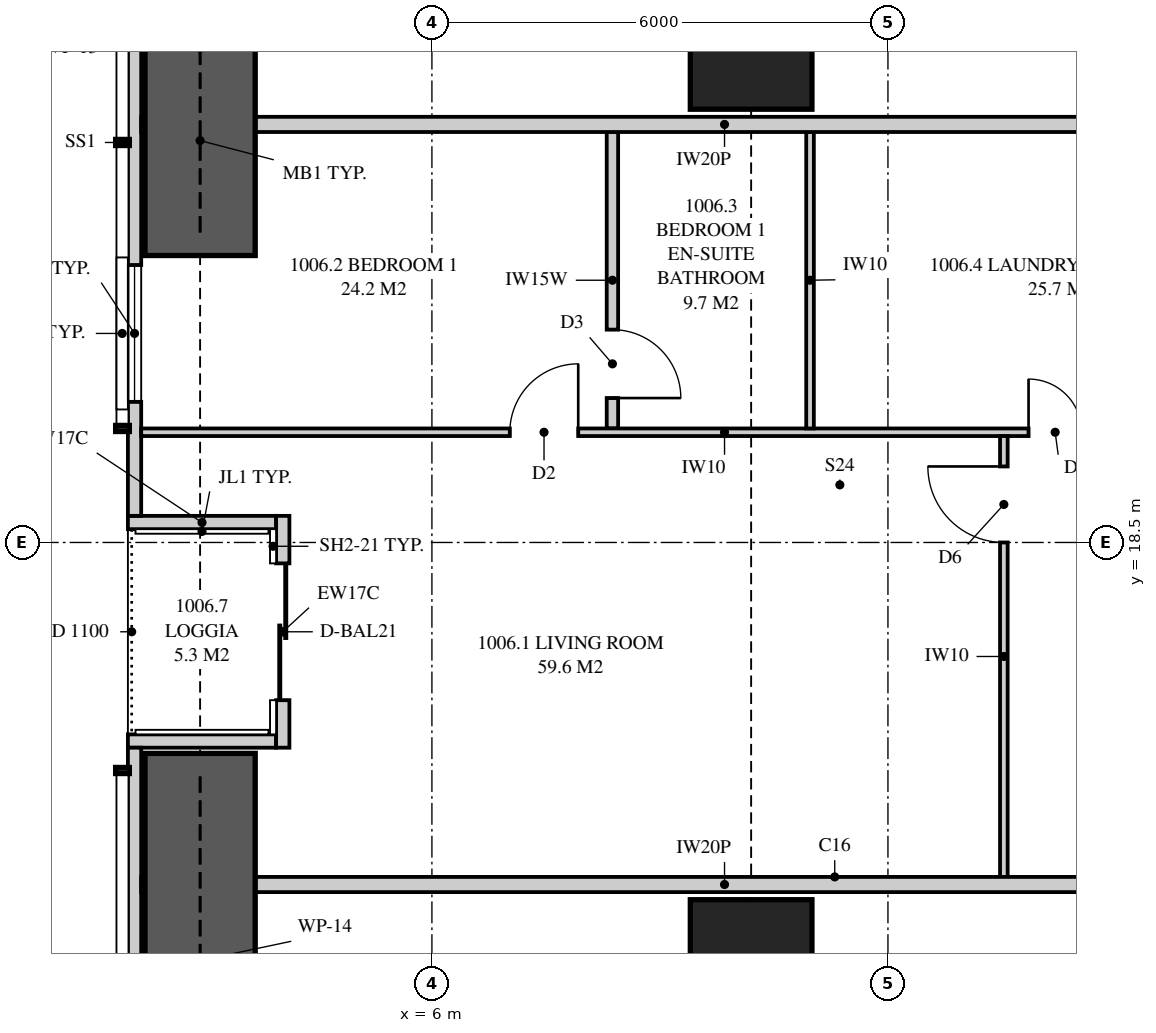
"""IFC4 building model, lengths in metres.
Left out: names, types, materials, properties, quantities, classifications, styles, units other than length and angle.
Written with IfcOpenShell. Run it as: python <this file> out.ifc"""

import sys

from ifc_helpers import new_model, si_unit, direction, frame, frame_2d, origin, origin_2d, place, context, subcontext, project, spatial, polyline, rectangle, outline, extrude, element, fill, save


model = new_model("IFC4")
c1 = context("Model", 3, precision=1e-05, world=origin(), true_north=direction((0.0, 1.0)))
c2 = subcontext(c1, "Body", "Model", "MODEL_VIEW")
j1 = project(units=[si_unit("LENGTHUNIT", "METRE"), si_unit("PLANEANGLEUNIT", "RADIAN")], contexts=[c1])
p1 = place(None, origin())
s1 = spatial("IfcSite", under=j1, at=p1, CompositionType="ELEMENT")
p2 = place(p1, origin())
s2 = spatial("IfcBuilding", under=s1, at=p2, CompositionType="ELEMENT")
p3 = place(p2, frame((0.0, 0.0, 41.1)))
s3 = spatial("IfcBuildingStorey", under=s2, at=p3, CompositionType="ELEMENT", Elevation=41.1)
for number, where, z_axis, x_axis in (
    (1, (10.2, 13.0, 0.0), (0.0, 0.0, 1.0), (1.0, 0.0, 0.0)),
    (2, (10.2, 25.0, 0.0), (0.0, 0.0, 1.0), (1.0, 0.0, 0.0)),
):
    element("IfcColumn", number, at=place(p3, frame(where, z_axis=z_axis, x_axis=x_axis)), inside=s3, PredefinedType="COLUMN", context=c2, shape_type="SweptSolid", body=[
        extrude(rectangle(XDim=1.6, YDim=1.6, at=origin_2d()), origin(), (0.0, 0.0, 1.0), 3.35),
    ])
p4 = place(p3, frame((2.087, 34.949, 0.0), z_axis=(0.0, 0.0, 1.0), x_axis=(0.0, -1.0, 0.0)))
e3 = element("IfcWall", 3, at=p4, inside=s3, PredefinedType="SOLIDWALL", context=c2, shape_type="SweptSolid", body=[
    extrude(outline(polyline([(0.0, 0.0), (16.099, 0.0), (16.099, 2.15), (9.949, 2.15), (9.949, 3.11), (9.823, 3.11), (9.823, 2.15), (9.73, 2.15), (9.73, 3.11), (0.0, 3.11), (0.0, 0.0)])), frame((0.0, 0.087, 0.0), z_axis=(0.0, -1.0, 0.0), x_axis=(1.0, 0.0, 0.0)), (0.0, 0.0, 1.0), 0.175),
])
p5 = place(p4, frame((2.757, 0.0, 0.4)))
e4 = element("IfcOpeningElement", 4, at=p5, cuts=e3, PredefinedType="OPENING", context=c2, shape_type="SweptSolid", body=[
    extrude(rectangle(XDim=1.8, YDim=1.7, at=frame_2d((0.9, 0.85))), frame((0.0, 0.097, 0.0), z_axis=(0.0, -1.0, 0.0), x_axis=(1.0, 0.0, 0.0)), (0.0, 0.0, 1.0), 0.195),
])
p6 = place(p4, frame((5.924, 0.0, 0.4)))
e5 = element("IfcOpeningElement", 5, at=p6, cuts=e3, PredefinedType="OPENING", context=c2, shape_type="SweptSolid", body=[
    extrude(rectangle(XDim=1.2, YDim=1.7, at=frame_2d((0.6, 0.85))), frame((0.0, 0.097, 0.0), z_axis=(0.0, -1.0, 0.0), x_axis=(1.0, 0.0, 0.0)), (0.0, 0.0, 1.0), 0.195),
])
p7 = place(p4, frame((12.799, 0.0, 0.4)))
e6 = element("IfcOpeningElement", 6, at=p7, cuts=e3, PredefinedType="OPENING", context=c2, shape_type="SweptSolid", body=[
    extrude(rectangle(XDim=1.8, YDim=1.7, at=frame_2d((0.9, 0.85))), frame((0.0, 0.097, 0.0), z_axis=(0.0, -1.0, 0.0), x_axis=(1.0, 0.0, 0.0)), (0.0, 0.0, 1.0), 0.195),
])
p8 = place(p3, frame((2.087, 15.8, 0.0), z_axis=(0.0, 0.0, 1.0), x_axis=(0.0, -1.0, 0.0)))
e7 = element("IfcWall", 7, at=p8, inside=s3, PredefinedType="SOLIDWALL", context=c2, shape_type="SweptSolid", body=[
    extrude(outline(polyline([(0.0, 0.0), (12.749, 0.0), (12.749, 3.11), (3.019, 3.11), (3.019, 2.15), (2.926, 2.15), (2.926, 3.11), (2.8, 3.11), (2.8, 2.15), (0.0, 2.15), (0.0, 0.0)])), frame((0.0, 0.087, 0.0), z_axis=(0.0, -1.0, 0.0), x_axis=(1.0, 0.0, 0.0)), (0.0, 0.0, 1.0), 0.175),
])
p9 = place(p8, frame((5.65, 0.0, 0.4)))
e8 = element("IfcOpeningElement", 8, at=p9, cuts=e7, PredefinedType="OPENING", context=c2, shape_type="SweptSolid", body=[
    extrude(rectangle(XDim=1.2, YDim=1.7, at=frame_2d((0.6, 0.85))), frame((0.0, 0.097, 0.0), z_axis=(0.0, -1.0, 0.0), x_axis=(1.0, 0.0, 0.0)), (0.0, 0.0, 1.0), 0.195),
])
p10 = place(p8, frame((8.691, 0.0, 0.4)))
e9 = element("IfcOpeningElement", 9, at=p10, cuts=e7, PredefinedType="OPENING", context=c2, shape_type="SweptSolid", body=[
    extrude(rectangle(XDim=1.8, YDim=1.7, at=frame_2d((0.9, 0.85))), frame((0.0, 0.097, 0.0), z_axis=(0.0, -1.0, 0.0), x_axis=(1.0, 0.0, 0.0)), (0.0, 0.0, 1.0), 0.195),
])
p11 = place(p3, frame((4.038, 18.85, 0.0), z_axis=(0.0, 0.0, 1.0), x_axis=(0.0, -1.0, 0.0)))
e10 = element("IfcWall", 10, at=p11, inside=s3, PredefinedType="SOLIDWALL", context=c2, shape_type="SweptSolid", body=[
    extrude(rectangle(XDim=3.05, YDim=0.175, at=frame_2d((1.525, 0.0))), origin(), (0.0, 0.0, 1.0), 3.11),
])
p12 = place(p11, frame((0.625, 0.0, 0.0)))
e11 = element("IfcOpeningElement", 11, at=p12, cuts=e10, PredefinedType="OPENING", context=c2, shape_type="SweptSolid", body=[
    extrude(rectangle(XDim=1.8, YDim=2.1, at=frame_2d((0.9, 1.05))), frame((0.0, 0.097, 0.0), z_axis=(0.0, -1.0, 0.0), x_axis=(1.0, 0.0, 0.0)), (0.0, 0.0, 1.0), 0.195),
])
for number, where, z_axis, x_axis in (
    (12, (2.0, 18.762, 0.0), (0.0, 0.0, 1.0), (1.0, 0.0, 0.0)),
    (13, (2.0, 15.887, 0.0), (0.0, 0.0, 1.0), (1.0, 0.0, 0.0)),
):
    element("IfcWall", number, at=place(p3, frame(where, z_axis=z_axis, x_axis=x_axis)), inside=s3, PredefinedType="SOLIDWALL", context=c2, shape_type="SweptSolid", body=[
        extrude(outline(polyline([(0.0, 0.0), (1.95, 0.0), (1.95, 3.11), (1.75, 3.11), (1.75, 2.15), (0.15, 2.15), (0.15, 3.11), (0.0, 3.11), (0.0, 0.0)])), frame((0.0, 0.087, 0.0), z_axis=(0.0, -1.0, 0.0), x_axis=(1.0, 0.0, 0.0)), (0.0, 0.0, 1.0), 0.175),
    ])
for number, where, z_axis, x_axis in (
    (14, (2.175, 14.0, 0.0), (0.0, 0.0, 1.0), (1.0, 0.0, 0.0)),
    (15, (2.175, 24.0, 0.0), (0.0, 0.0, 1.0), (1.0, 0.0, 0.0)),
):
    element("IfcWall", number, at=place(p3, frame(where, z_axis=z_axis, x_axis=x_axis)), inside=s3, PredefinedType="PARTITIONING", context=c2, shape_type="SweptSolid", body=[
        extrude(outline(polyline([(0.529, 2.15), (0.0, 2.15), (0.0, 0.0), (0.529, 0.0), (0.529, 0.815), (1.021, 0.815), (1.021, 0.0), (15.35, 0.0), (15.35, 3.11), (9.335, 3.11), (9.335, 2.51), (6.715, 2.51), (6.715, 3.11), (1.685, 3.11), (1.685, 2.15), (1.021, 2.15), (1.021, 1.335), (0.529, 1.335), (0.529, 2.15)])), frame((0.0, 0.1, 0.0), z_axis=(0.0, -1.0, 0.0), x_axis=(1.0, 0.0, 0.0)), (0.0, 0.0, 1.0), 0.2),
    ])
p13 = place(p3, frame((2.175, 19.95, 0.0), z_axis=(0.0, 0.0, 1.0), x_axis=(1.0, 0.0, 0.0)))
e16 = element("IfcWall", 16, at=p13, inside=s3, PredefinedType="PARTITIONING", context=c2, shape_type="SweptSolid", body=[
    extrude(outline(polyline([(0.0, 0.0), (15.35, 0.0), (15.35, 3.11), (9.285, 3.11), (9.285, 2.51), (6.765, 2.51), (6.765, 3.11), (1.635, 3.11), (1.635, 2.15), (0.0, 2.15), (0.0, 3.11), (0.0, 0.0)])), frame((0.0, 0.05, 0.0), z_axis=(0.0, -1.0, 0.0), x_axis=(1.0, 0.0, 0.0)), (0.0, 0.0, 1.0), 0.1),
])
p14 = place(p13, frame((4.85, 0.0, 0.0)))
e17 = element("IfcOpeningElement", 17, at=p14, cuts=e16, PredefinedType="OPENING", context=c2, shape_type="SweptSolid", body=[
    extrude(rectangle(XDim=0.9, YDim=2.1, at=frame_2d((0.45, 1.05))), frame((0.0, 0.06, 0.0), z_axis=(0.0, -1.0, 0.0), x_axis=(1.0, 0.0, 0.0)), (0.0, 0.0, 1.0), 0.12),
])
p15 = place(p13, frame((11.675, 0.0, 0.0)))
e18 = element("IfcOpeningElement", 18, at=p15, cuts=e16, PredefinedType="OPENING", context=c2, shape_type="SweptSolid", body=[
    extrude(rectangle(XDim=0.7, YDim=2.1, at=frame_2d((0.35, 1.05))), frame((0.0, 0.06, 0.0), z_axis=(0.0, -1.0, 0.0), x_axis=(1.0, 0.0, 0.0)), (0.0, 0.0, 1.0), 0.12),
])
p16 = place(p3, frame((8.375, 20.0, 0.0), z_axis=(0.0, 0.0, 1.0), x_axis=(0.0, 1.0, 0.0)))
e19 = element("IfcWall", 19, at=p16, inside=s3, PredefinedType="PLUMBINGWALL", context=c2, shape_type="SweptSolid", body=[
    extrude(rectangle(XDim=3.9, YDim=0.15, at=frame_2d((1.95, 0.0))), origin(), (0.0, 0.0, 1.0), 3.11),
])
p17 = place(p16, frame((0.4, 0.0, 0.0)))
e20 = element("IfcOpeningElement", 20, at=p17, cuts=e19, PredefinedType="OPENING", context=c2, shape_type="SweptSolid", body=[
    extrude(rectangle(XDim=0.9, YDim=2.1, at=frame_2d((0.45, 1.05))), frame((0.0, 0.085, 0.0), z_axis=(0.0, -1.0, 0.0), x_axis=(1.0, 0.0, 0.0)), (0.0, 0.0, 1.0), 0.17),
])
p18 = place(p3, frame((10.975, 20.0, 0.0), z_axis=(0.0, 0.0, 1.0), x_axis=(0.0, 1.0, 0.0)))
e21 = element("IfcWall", 21, at=p18, inside=s3, PredefinedType="PARTITIONING", context=c2, shape_type="SweptSolid", body=[
    extrude(outline(polyline([(0.0, 0.0), (3.9, 0.0), (3.9, 3.11), (3.9, 2.51), (0.0, 2.51), (0.0, 3.11), (0.0, 0.0)])), frame((0.0, 0.05, 0.0), z_axis=(0.0, -1.0, 0.0), x_axis=(1.0, 0.0, 0.0)), (0.0, 0.0, 1.0), 0.1),
])
p19 = place(p3, frame((13.525, 14.1, 0.0), z_axis=(0.0, 0.0, 1.0), x_axis=(0.0, 1.0, 0.0)))
e22 = element("IfcWall", 22, at=p19, inside=s3, PredefinedType="PARTITIONING", context=c2, shape_type="SweptSolid", body=[
    extrude(rectangle(XDim=5.8, YDim=0.1, at=frame_2d((2.9, 0.0))), origin(), (0.0, 0.0, 1.0), 3.11),
])
p20 = place(p19, frame((4.4, 0.0, 0.0)))
e23 = element("IfcOpeningElement", 23, at=p20, cuts=e22, PredefinedType="OPENING", context=c2, shape_type="SweptSolid", body=[
    extrude(rectangle(XDim=1.0, YDim=2.1, at=frame_2d((0.5, 1.05))), frame((0.0, 0.06, 0.0), z_axis=(0.0, -1.0, 0.0), x_axis=(1.0, 0.0, 0.0)), (0.0, 0.0, 1.0), 0.12),
])
for number, where, z_axis, x_axis in (
    (24, (2.95, 22.275, 0.0), (0.0, 0.0, 1.0), (0.0, 1.0, 0.0)),
    (25, (2.95, 10.275, 0.0), (0.0, 0.0, 1.0), (0.0, 1.0, 0.0)),
):
    element("IfcWall", number, at=place(p3, frame(where, z_axis=z_axis, x_axis=x_axis)), inside=s3, PredefinedType="SHEAR", context=c2, shape_type="SweptSolid", body=[
        extrude(rectangle(XDim=5.45, YDim=1.45, at=frame_2d((2.725, 0.0))), origin(), (0.0, 0.0, 1.0), 3.35),
    ])
p21 = place(p7, origin())
e26 = element("IfcWindow", 26, at=p21, inside=s3, PartitioningType="SINGLE_PANEL", PredefinedType="WINDOW", context=c2, shape_type="SweptSolid", body=[
    extrude(rectangle(XDim=1.8, YDim=1.7, at=frame_2d((0.9, 0.85))), frame((0.0, 0.03, 0.0), z_axis=(0.0, -1.0, 0.0), x_axis=(1.0, 0.0, 0.0)), (0.0, 0.0, 1.0), 0.06),
])
fill(e6, e26)
p22 = place(p12, origin())
e27 = element("IfcDoor", 27, at=p22, inside=s3, OperationType="SLIDING_TO_LEFT", PredefinedType="DOOR", context=c2, shape_type="SweptSolid", body=[
    extrude(rectangle(XDim=1.8, YDim=2.1, at=frame_2d((0.9, 1.05))), frame((0.0, 0.025, 0.0), z_axis=(0.0, -1.0, 0.0), x_axis=(1.0, 0.0, 0.0)), (0.0, 0.0, 1.0), 0.05),
])
fill(e11, e27)
p23 = place(p14, origin())
e28 = element("IfcDoor", 28, at=p23, inside=s3, OperationType="SINGLE_SWING_RIGHT", PredefinedType="DOOR", context=c2, shape_type="SweptSolid", body=[
    extrude(rectangle(XDim=0.9, YDim=2.1, at=frame_2d((0.45, 1.05))), frame((0.0, 0.025, 0.0), z_axis=(0.0, -1.0, 0.0), x_axis=(1.0, 0.0, 0.0)), (0.0, 0.0, 1.0), 0.05),
])
fill(e17, e28)
p24 = place(p17, frame((0.9, 0.0, 0.0), z_axis=(0.0, 0.0, 1.0), x_axis=(-1.0, 0.0, 0.0)))
e29 = element("IfcDoor", 29, at=p24, inside=s3, OperationType="SINGLE_SWING_RIGHT", PredefinedType="DOOR", context=c2, shape_type="SweptSolid", body=[
    extrude(rectangle(XDim=0.9, YDim=2.1, at=frame_2d((0.45, 1.05))), frame((0.0, 0.025, 0.0), z_axis=(0.0, -1.0, 0.0), x_axis=(1.0, 0.0, 0.0)), (0.0, 0.0, 1.0), 0.05),
])
fill(e20, e29)
p25 = place(p15, origin())
e30 = element("IfcDoor", 30, at=p25, inside=s3, OperationType="SINGLE_SWING_LEFT", PredefinedType="DOOR", context=c2, shape_type="SweptSolid", body=[
    extrude(rectangle(XDim=0.7, YDim=2.1, at=frame_2d((0.35, 1.05))), frame((0.0, 0.025, 0.0), z_axis=(0.0, -1.0, 0.0), x_axis=(1.0, 0.0, 0.0)), (0.0, 0.0, 1.0), 0.05),
])
fill(e18, e30)
p26 = place(p20, origin())
e31 = element("IfcDoor", 31, at=p26, inside=s3, OperationType="SINGLE_SWING_RIGHT", PredefinedType="DOOR", context=c2, shape_type="SweptSolid", body=[
    extrude(rectangle(XDim=1.0, YDim=2.1, at=frame_2d((0.5, 1.05))), frame((0.0, 0.025, 0.0), z_axis=(0.0, -1.0, 0.0), x_axis=(1.0, 0.0, 0.0)), (0.0, 0.0, 1.0), 0.05),
])
fill(e23, e31)
save(model, sys.argv[1])
